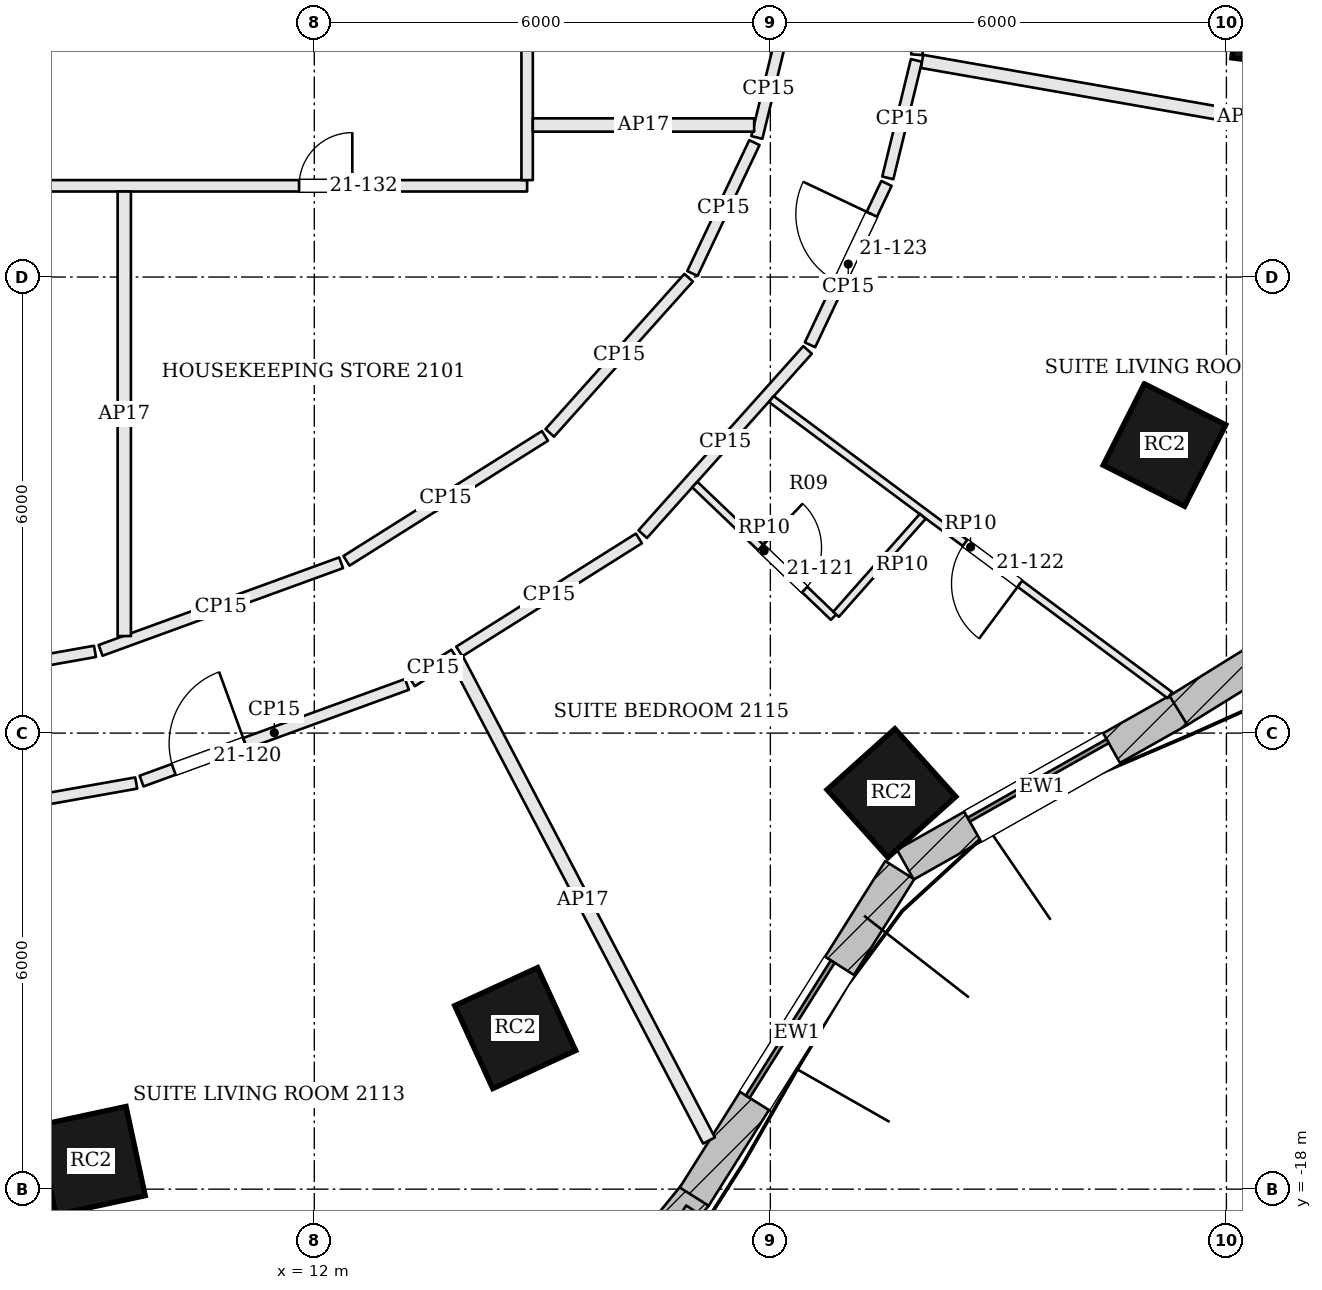
"""IFC4 building model, lengths in metres.
Left out: names, types, materials, properties, quantities, classifications, styles, units other than length and angle.
Written with IfcOpenShell. Run it as: python <this file> out.ifc"""

import sys

from ifc_helpers import new_model, si_unit, direction, frame, frame_2d, origin, origin_2d, place, context, subcontext, project, spatial, rectangle, extrude, element, fill, save


model = new_model("IFC4")
c1 = context("Model", 3, precision=1e-05, world=origin(), true_north=direction((0.0, 1.0)))
c2 = subcontext(c1, "Body", "Model", "MODEL_VIEW")
j1 = project(units=[si_unit("LENGTHUNIT", "METRE"), si_unit("PLANEANGLEUNIT", "RADIAN")], contexts=[c1])
p1 = place(None, origin())
s1 = spatial("IfcSite", under=j1, at=p1, CompositionType="ELEMENT")
p2 = place(p1, origin())
s2 = spatial("IfcBuilding", under=s1, at=p2, CompositionType="ELEMENT")
p3 = place(p2, frame((0.0, 0.0, 92.4)))
s3 = spatial("IfcBuildingStorey", under=s2, at=p3, CompositionType="ELEMENT", Elevation=92.4)
for number, where, z_axis, x_axis in (
    (1, (9.063, -17.625, 0.0), (0.0, 0.0, 1.0), (0.978, 0.21, 0.0)),
    (2, (14.643, -15.881, 0.0), (0.0, 0.0, 1.0), (0.909, 0.417, 0.0)),
    (3, (19.593, -12.79, 0.0), (0.0, 0.0, 1.0), (0.744, 0.668, 0.0)),
    (4, (23.185, -8.21, 0.0), (0.0, 0.0, 1.0), (0.451, 0.893, 0.0)),
    (5, (24.743, -2.599, 0.0), (0.0, 0.0, 1.0), (0.128, 0.992, 0.0)),
):
    element("IfcColumn", number, at=place(p3, frame(where, z_axis=z_axis, x_axis=x_axis)), inside=s3, PredefinedType="COLUMN", context=c2, shape_type="SweptSolid", body=[
        extrude(rectangle(XDim=1.2, YDim=1.2, at=origin_2d()), origin(), (0.0, 0.0, 1.0), 3.6),
    ])
p4 = place(p3, frame((14.926, -20.641, 0.0), z_axis=(0.0, 0.0, 1.0), x_axis=(0.631548074669, 0.775336720001, 0.0)))
e6 = element("IfcWall", 6, at=p4, inside=s3, PredefinedType="SOLIDWALL", context=c2, shape_type="SweptSolid", body=[
    extrude(rectangle(XDim=3.308, YDim=0.45, at=frame_2d((1.654, 0.0))), origin(), (0.0, 0.0, 1.0), 3.4),
])
p5 = place(p4, frame((0.604, 0.0, 0.9)))
e7 = element("IfcOpeningElement", 7, at=p5, cuts=e6, PredefinedType="OPENING", context=c2, shape_type="SweptSolid", body=[
    extrude(rectangle(XDim=2.1, YDim=2.0, at=frame_2d((1.05, 1.0))), frame((0.0, 0.235, 0.0), z_axis=(0.0, -1.0, 0.0), x_axis=(1.0, 0.0, 0.0)), (0.0, 0.0, 1.0), 0.47),
])
p6 = place(p3, frame((16.998, -18.099, 0.0), z_axis=(0.0, 0.0, 1.0), x_axis=(0.532745661304, 0.846275404559, 0.0)))
e8 = element("IfcWall", 8, at=p6, inside=s3, PredefinedType="SOLIDWALL", context=c2, shape_type="SweptSolid", body=[
    extrude(rectangle(XDim=5.076, YDim=0.45, at=frame_2d((2.538, 0.0))), origin(), (0.0, 0.0, 1.0), 3.4),
])
p7 = place(p6, frame((1.488, 0.0, 0.9)))
e9 = element("IfcOpeningElement", 9, at=p7, cuts=e8, PredefinedType="OPENING", context=c2, shape_type="SweptSolid", body=[
    extrude(rectangle(XDim=2.1, YDim=2.0, at=frame_2d((1.05, 1.0))), frame((0.0, 0.235, 0.0), z_axis=(0.0, -1.0, 0.0), x_axis=(1.0, 0.0, 0.0)), (0.0, 0.0, 1.0), 0.47),
])
p8 = place(p3, frame((19.776, -13.731, 0.0), z_axis=(0.0, 0.0, 1.0), x_axis=(0.870610133829, 0.491973571318, 0.0)))
e10 = element("IfcWall", 10, at=p8, inside=s3, PredefinedType="SOLIDWALL", context=c2, shape_type="SweptSolid", body=[
    extrude(rectangle(XDim=4.134, YDim=0.45, at=frame_2d((2.067, 0.0))), origin(), (0.0, 0.0, 1.0), 3.4),
])
p9 = place(p8, frame((1.017, 0.0, 0.9)))
e11 = element("IfcOpeningElement", 11, at=p9, cuts=e10, PredefinedType="OPENING", context=c2, shape_type="SweptSolid", body=[
    extrude(rectangle(XDim=2.1, YDim=2.0, at=frame_2d((1.05, 1.0))), frame((0.0, 0.235, 0.0), z_axis=(0.0, -1.0, 0.0), x_axis=(1.0, 0.0, 0.0)), (0.0, 0.0, 1.0), 0.47),
])
p10 = place(p3, frame((23.368, -11.701, 0.0), z_axis=(0.0, 0.0, 1.0), x_axis=(0.850251408633, 0.526376806211, 0.0)))
e12 = element("IfcWall", 12, at=p10, inside=s3, PredefinedType="SOLIDWALL", context=c2, shape_type="SweptSolid", body=[
    extrude(rectangle(XDim=5.302, YDim=0.45, at=frame_2d((2.651, 0.0))), origin(), (0.0, 0.0, 1.0), 3.4),
])
p11 = place(p10, frame((1.601, 0.0, 0.9)))
e13 = element("IfcOpeningElement", 13, at=p11, cuts=e12, PredefinedType="OPENING", context=c2, shape_type="SweptSolid", body=[
    extrude(rectangle(XDim=2.1, YDim=2.0, at=frame_2d((1.05, 1.0))), frame((0.0, 0.235, 0.0), z_axis=(0.0, -1.0, 0.0), x_axis=(1.0, 0.0, 0.0)), (0.0, 0.0, 1.0), 0.47),
])
p12 = place(p3, frame((16.838, -18.298, 0.0), z_axis=(0.0, 0.0, 1.0), x_axis=(0.835871900419, -0.548924554097, 0.0)))
e14 = element("IfcWall", 14, at=p12, inside=s3, PredefinedType="SOLIDWALL", context=c2, shape_type="SweptSolid", body=[
    extrude(rectangle(XDim=1.75, YDim=0.2, at=frame_2d((0.875, 0.0))), origin(), (0.0, 0.0, 1.0), 3.4),
])
p13 = place(p3, frame((5.015, -13.48, 0.0), z_axis=(0.0, 0.0, 1.0), x_axis=(0.984637772103, 0.174609443467, 0.0)))
e15 = element("IfcWall", 15, at=p13, inside=s3, PredefinedType="PARTITIONING", context=c2, shape_type="SweptSolid", body=[
    extrude(rectangle(XDim=4.715, YDim=0.15, at=frame_2d((2.357, 0.0))), origin(), (0.0, 0.0, 1.0), 2.784),
])
p14 = place(p3, frame((9.728, -12.631, 0.0), z_axis=(0.0, 0.0, 1.0), x_axis=(0.939626438181, 0.342201923826, 0.0)))
e16 = element("IfcWall", 16, at=p14, inside=s3, PredefinedType="PARTITIONING", context=c2, shape_type="SweptSolid", body=[
    extrude(rectangle(XDim=3.716, YDim=0.15, at=frame_2d((1.858, 0.0))), origin(), (0.0, 0.0, 1.0), 2.784),
])
p15 = place(p14, frame((0.45, 0.0, 0.0)))
e17 = element("IfcOpeningElement", 17, at=p15, cuts=e16, PredefinedType="OPENING", context=c2, shape_type="SweptSolid", body=[
    extrude(rectangle(XDim=1.0, YDim=2.1, at=frame_2d((0.5, 1.05))), frame((0.0, 0.085, 0.0), z_axis=(0.0, -1.0, 0.0), x_axis=(1.0, 0.0, 0.0)), (0.0, 0.0, 1.0), 0.17),
])
p16 = place(p3, frame((13.283, -11.319, 0.0), z_axis=(0.0, 0.0, 1.0), x_axis=(0.846275904875, 0.532744866543, 0.0)))
e18 = element("IfcWall", 18, at=p16, inside=s3, PredefinedType="PARTITIONING", context=c2, shape_type="SweptSolid", body=[
    extrude(rectangle(XDim=0.663, YDim=0.15, at=frame_2d((0.331, 0.0))), origin(), (0.0, 0.0, 1.0), 2.784),
])
p17 = place(p3, frame((17.193, -17.36, 0.0), z_axis=(0.0, 0.0, 1.0), x_axis=(-0.464005717448, 0.8858322043, 0.0)))
e19 = element("IfcWall", 19, at=p17, inside=s3, PredefinedType="PARTITIONING", context=c2, shape_type="SweptSolid", body=[
    extrude(rectangle(XDim=7.143, YDim=0.175, at=frame_2d((3.571, 0.0))), origin(), (0.0, 0.0, 1.0), 2.784),
])
p18 = place(p3, frame((13.907, -10.927, 0.0), z_axis=(0.0, 0.0, 1.0), x_axis=(0.846289768331, 0.53272284353, 0.0)))
e20 = element("IfcWall", 20, at=p18, inside=s3, PredefinedType="PARTITIONING", context=c2, shape_type="SweptSolid", body=[
    extrude(rectangle(XDim=2.793, YDim=0.15, at=frame_2d((1.396, 0.0))), origin(), (0.0, 0.0, 1.0), 2.784),
])
p19 = place(p3, frame((16.321, -9.383, 0.0), z_axis=(0.0, 0.0, 1.0), x_axis=(0.666834356165, 0.745205972492, 0.0)))
e21 = element("IfcWall", 21, at=p19, inside=s3, PredefinedType="PARTITIONING", context=c2, shape_type="SweptSolid", body=[
    extrude(rectangle(XDim=3.252, YDim=0.15, at=frame_2d((1.626, 0.0))), origin(), (0.0, 0.0, 1.0), 2.784),
])
p20 = place(p3, frame((18.522, -6.891, 0.0), z_axis=(0.0, 0.0, 1.0), x_axis=(0.428157819028, 0.903703979191, 0.0)))
e22 = element("IfcWall", 22, at=p20, inside=s3, PredefinedType="PARTITIONING", context=c2, shape_type="SweptSolid", body=[
    extrude(rectangle(XDim=2.349, YDim=0.15, at=frame_2d((1.175, 0.0))), origin(), (0.0, 0.0, 1.0), 2.784),
])
p21 = place(p20, frame((0.9, 0.0, 0.0)))
e23 = element("IfcOpeningElement", 23, at=p21, cuts=e22, PredefinedType="OPENING", context=c2, shape_type="SweptSolid", body=[
    extrude(rectangle(XDim=1.0, YDim=2.1, at=frame_2d((0.5, 1.05))), frame((0.0, 0.085, 0.0), z_axis=(0.0, -1.0, 0.0), x_axis=(1.0, 0.0, 0.0)), (0.0, 0.0, 1.0), 0.17),
])
p22 = place(p3, frame((19.545, -4.696, 0.0), z_axis=(0.0, 0.0, 1.0), x_axis=(0.236715862945, 0.971578921257, 0.0)))
e24 = element("IfcWall", 24, at=p22, inside=s3, PredefinedType="PARTITIONING", context=c2, shape_type="SweptSolid", body=[
    extrude(rectangle(XDim=1.59, YDim=0.15, at=frame_2d((0.795, 0.0))), origin(), (0.0, 0.0, 1.0), 2.784),
])
p23 = place(p3, frame((28.436, -4.638, 0.0), z_axis=(0.0, 0.0, 1.0), x_axis=(-0.985072773891, 0.172138404023, 0.0)))
e25 = element("IfcWall", 25, at=p23, inside=s3, PredefinedType="PARTITIONING", context=c2, shape_type="SweptSolid", body=[
    extrude(rectangle(XDim=8.568, YDim=0.175, at=frame_2d((4.284, 0.0))), origin(), (0.0, 0.0, 1.0), 2.784),
])
p24 = place(p3, frame((19.927, -3.076, 0.0), z_axis=(0.0, 0.0, 1.0), x_axis=(0.071888451482, 0.997412678155, 0.0)))
e26 = element("IfcWall", 26, at=p24, inside=s3, PredefinedType="PARTITIONING", context=c2, shape_type="SweptSolid", body=[
    extrude(rectangle(XDim=3.084, YDim=0.15, at=frame_2d((1.542, 0.0))), origin(), (0.0, 0.0, 1.0), 2.784),
])
p25 = place(p3, frame((18.135, -2.882, 0.0), z_axis=(0.0, 0.0, 1.0), x_axis=(-0.236653741324, -0.971594054489, 0.0)))
e27 = element("IfcWall", 27, at=p25, inside=s3, PredefinedType="PARTITIONING", context=c2, shape_type="SweptSolid", body=[
    extrude(rectangle(XDim=1.32, YDim=0.15, at=frame_2d((0.66, 0.0))), origin(), (0.0, 0.0, 1.0), 2.784),
])
p26 = place(p3, frame((17.79, -4.231, 0.0), z_axis=(0.0, 0.0, 1.0), x_axis=(-0.428042272357, -0.90375871397, 0.0)))
e28 = element("IfcWall", 28, at=p26, inside=s3, PredefinedType="PARTITIONING", context=c2, shape_type="SweptSolid", body=[
    extrude(rectangle(XDim=1.905, YDim=0.15, at=frame_2d((0.953, 0.0))), origin(), (0.0, 0.0, 1.0), 2.784),
])
p27 = place(p3, frame((16.925, -6.009, 0.0), z_axis=(0.0, 0.0, 1.0), x_axis=(-0.666893859891, -0.745152722359, 0.0)))
e29 = element("IfcWall", 29, at=p27, inside=s3, PredefinedType="PARTITIONING", context=c2, shape_type="SweptSolid", body=[
    extrude(rectangle(XDim=2.739, YDim=0.15, at=frame_2d((1.37, 0.0))), origin(), (0.0, 0.0, 1.0), 2.784),
])
p28 = place(p3, frame((15.034, -8.09, 0.0), z_axis=(0.0, 0.0, 1.0), x_axis=(-0.846322679414, -0.532670557014, 0.0)))
e30 = element("IfcWall", 30, at=p28, inside=s3, PredefinedType="PARTITIONING", context=c2, shape_type="SweptSolid", body=[
    extrude(rectangle(XDim=3.085, YDim=0.15, at=frame_2d((1.543, 0.0))), origin(), (0.0, 0.0, 1.0), 2.784),
])
p29 = place(p3, frame((12.353, -9.76, 0.0), z_axis=(0.0, 0.0, 1.0), x_axis=(-0.939632450309, -0.342185415127, 0.0)))
e31 = element("IfcWall", 31, at=p29, inside=s3, PredefinedType="PARTITIONING", context=c2, shape_type="SweptSolid", body=[
    extrude(rectangle(XDim=3.368, YDim=0.15, at=frame_2d((1.684, 0.0))), origin(), (0.0, 0.0, 1.0), 2.784),
])
p30 = place(p3, frame((9.115, -10.925, 0.0), z_axis=(0.0, 0.0, 1.0), x_axis=(-0.984632605417, -0.174638576352, 0.0)))
e32 = element("IfcWall", 32, at=p30, inside=s3, PredefinedType="PARTITIONING", context=c2, shape_type="SweptSolid", body=[
    extrude(rectangle(XDim=4.423, YDim=0.15, at=frame_2d((2.211, 0.0))), origin(), (0.0, 0.0, 1.0), 2.784),
])
p31 = place(p3, frame((-14.725, -4.8, 0.0), z_axis=(0.0, 0.0, 1.0), x_axis=(1.0, 0.0, 0.0)))
e33 = element("IfcWall", 33, at=p31, inside=s3, PredefinedType="PARTITIONING", context=c2, shape_type="SweptSolid", body=[
    extrude(rectangle(XDim=29.525, YDim=0.15, at=frame_2d((14.763, 0.0))), origin(), (0.0, 0.0, 1.0), 2.784),
])
p32 = place(p31, frame((2.075, 0.0, 0.0)))
e34 = element("IfcOpeningElement", 34, at=p32, cuts=e33, PredefinedType="OPENING", context=c2, shape_type="SweptSolid", body=[
    extrude(rectangle(XDim=1.0, YDim=2.1, at=frame_2d((0.5, 1.05))), frame((0.0, 0.085, 0.0), z_axis=(0.0, -1.0, 0.0), x_axis=(1.0, 0.0, 0.0)), (0.0, 0.0, 1.0), 0.17),
])
p33 = place(p31, frame((13.825, 0.0, 0.0)))
e35 = element("IfcOpeningElement", 35, at=p33, cuts=e33, PredefinedType="OPENING", context=c2, shape_type="SweptSolid", body=[
    extrude(rectangle(XDim=1.8, YDim=2.1, at=frame_2d((0.9, 1.05))), frame((0.0, 0.085, 0.0), z_axis=(0.0, -1.0, 0.0), x_axis=(1.0, 0.0, 0.0)), (0.0, 0.0, 1.0), 0.17),
])
p34 = place(p31, frame((26.525, 0.0, 0.0)))
e36 = element("IfcOpeningElement", 36, at=p34, cuts=e33, PredefinedType="OPENING", context=c2, shape_type="SweptSolid", body=[
    extrude(rectangle(XDim=0.7, YDim=2.1, at=frame_2d((0.35, 1.05))), frame((0.0, 0.085, 0.0), z_axis=(0.0, -1.0, 0.0), x_axis=(1.0, 0.0, 0.0)), (0.0, 0.0, 1.0), 0.17),
])
p35 = place(p3, frame((14.8, -4.725, 0.0), z_axis=(0.0, 0.0, 1.0), x_axis=(0.0, 1.0, 0.0)))
e37 = element("IfcWall", 37, at=p35, inside=s3, PredefinedType="PARTITIONING", context=c2, shape_type="SweptSolid", body=[
    extrude(rectangle(XDim=12.948, YDim=0.15, at=frame_2d((6.474, 0.0))), origin(), (0.0, 0.0, 1.0), 2.784),
])
p36 = place(p35, frame((6.336, 0.0, 0.0)))
e38 = element("IfcOpeningElement", 38, at=p36, cuts=e37, PredefinedType="OPENING", context=c2, shape_type="SweptSolid", body=[
    extrude(rectangle(XDim=1.0, YDim=2.1, at=frame_2d((0.5, 1.05))), frame((0.0, 0.085, 0.0), z_axis=(0.0, -1.0, 0.0), x_axis=(1.0, 0.0, 0.0)), (0.0, 0.0, 1.0), 0.17),
])
p37 = place(p3, frame((23.256, -11.501, 0.0), z_axis=(0.0, 0.0, 1.0), x_axis=(-0.802700401869, 0.596382482003, 0.0)))
e39 = element("IfcWall", 39, at=p37, inside=s3, PredefinedType="PARTITIONING", context=c2, shape_type="SweptSolid", body=[
    extrude(rectangle(XDim=6.533, YDim=0.1, at=frame_2d((3.267, 0.0))), origin(), (0.0, 0.0, 1.0), 2.884),
])
p38 = place(p37, frame((2.458, 0.0, 0.0)))
e40 = element("IfcOpeningElement", 40, at=p38, cuts=e39, PredefinedType="OPENING", context=c2, shape_type="SweptSolid", body=[
    extrude(rectangle(XDim=0.9, YDim=2.4, at=frame_2d((0.45, 1.2))), frame((0.0, 0.06, 0.0), z_axis=(0.0, -1.0, 0.0), x_axis=(1.0, 0.0, 0.0)), (0.0, 0.0, 1.0), 0.12),
])
p39 = place(p3, frame((17.006, -8.73, 0.0), z_axis=(0.0, 0.0, 1.0), x_axis=(0.722927369978, -0.690924031813, 0.0)))
e41 = element("IfcWall", 41, at=p39, inside=s3, PredefinedType="PARTITIONING", context=c2, shape_type="SweptSolid", body=[
    extrude(rectangle(XDim=2.525, YDim=0.1, at=frame_2d((1.263, 0.0))), origin(), (0.0, 0.0, 1.0), 2.884),
])
p40 = place(p39, frame((1.2, 0.0, 0.0)))
e42 = element("IfcOpeningElement", 42, at=p40, cuts=e41, PredefinedType="OPENING", context=c2, shape_type="SweptSolid", body=[
    extrude(rectangle(XDim=0.8, YDim=2.1, at=frame_2d((0.4, 1.05))), frame((0.0, 0.06, 0.0), z_axis=(0.0, -1.0, 0.0), x_axis=(1.0, 0.0, 0.0)), (0.0, 0.0, 1.0), 0.12),
])
p41 = place(p3, frame((18.865, -10.437, 0.0), z_axis=(0.0, 0.0, 1.0), x_axis=(0.662901257744, 0.748706833468, 0.0)))
e43 = element("IfcWall", 43, at=p41, inside=s3, PredefinedType="PARTITIONING", context=c2, shape_type="SweptSolid", body=[
    extrude(rectangle(XDim=1.721, YDim=0.1, at=frame_2d((0.861, 0.0))), origin(), (0.0, 0.0, 1.0), 2.884),
])
p42 = place(p3, frame((9.5, -10.723, 0.0), z_axis=(0.0, 0.0, 1.0), x_axis=(0.0, 1.0, 0.0)))
e44 = element("IfcWall", 44, at=p42, inside=s3, PredefinedType="PARTITIONING", context=c2, shape_type="SweptSolid", body=[
    extrude(rectangle(XDim=5.848, YDim=0.175, at=frame_2d((2.924, 0.0))), origin(), (0.0, 0.0, 1.0), 2.784),
])
p43 = place(p3, frame((14.875, -4.0, 0.0), z_axis=(0.0, 0.0, 1.0), x_axis=(1.0, 0.0, 0.0)))
e45 = element("IfcWall", 45, at=p43, inside=s3, PredefinedType="PARTITIONING", context=c2, shape_type="SweptSolid", body=[
    extrude(rectangle(XDim=2.912, YDim=0.175, at=frame_2d((1.456, 0.0))), origin(), (0.0, 0.0, 1.0), 2.784),
])
p44 = place(p7, origin())
e46 = element("IfcWindow", 46, at=p44, inside=s3, PartitioningType="SINGLE_PANEL", PredefinedType="WINDOW", context=c2, shape_type="SweptSolid", body=[
    extrude(rectangle(XDim=2.1, YDim=2.0, at=frame_2d((1.05, 1.0))), frame((0.0, 0.135, 0.0), z_axis=(0.0, -1.0, 0.0), x_axis=(1.0, 0.0, 0.0)), (0.0, 0.0, 1.0), 0.06),
])
fill(e9, e46)
p45 = place(p9, origin())
e47 = element("IfcWindow", 47, at=p45, inside=s3, PartitioningType="SINGLE_PANEL", PredefinedType="WINDOW", context=c2, shape_type="SweptSolid", body=[
    extrude(rectangle(XDim=2.1, YDim=2.0, at=frame_2d((1.05, 1.0))), frame((0.0, 0.135, 0.0), z_axis=(0.0, -1.0, 0.0), x_axis=(1.0, 0.0, 0.0)), (0.0, 0.0, 1.0), 0.06),
])
fill(e11, e47)
p46 = place(p15, origin())
e48 = element("IfcDoor", 48, at=p46, inside=s3, OperationType="SINGLE_SWING_RIGHT", PredefinedType="DOOR", context=c2, shape_type="SweptSolid", body=[
    extrude(rectangle(XDim=1.0, YDim=2.1, at=frame_2d((0.5, 1.05))), frame((0.0, 0.025, 0.0), z_axis=(0.0, -1.0, 0.0), x_axis=(1.0, 0.0, 0.0)), (0.0, 0.0, 1.0), 0.05),
])
fill(e17, e48)
p47 = place(p40, origin())
e49 = element("IfcDoor", 49, at=p47, inside=s3, OperationType="SINGLE_SWING_LEFT", PredefinedType="DOOR", context=c2, shape_type="SweptSolid", body=[
    extrude(rectangle(XDim=0.8, YDim=2.1, at=frame_2d((0.4, 1.05))), frame((0.0, 0.025, 0.0), z_axis=(0.0, -1.0, 0.0), x_axis=(1.0, 0.0, 0.0)), (0.0, 0.0, 1.0), 0.05),
])
fill(e42, e49)
p48 = place(p38, origin())
e50 = element("IfcDoor", 50, at=p48, inside=s3, OperationType="SINGLE_SWING_LEFT", PredefinedType="DOOR", context=c2, shape_type="SweptSolid", body=[
    extrude(rectangle(XDim=0.9, YDim=2.4, at=frame_2d((0.45, 1.2))), frame((0.0, 0.025, 0.0), z_axis=(0.0, -1.0, 0.0), x_axis=(1.0, 0.0, 0.0)), (0.0, 0.0, 1.0), 0.05),
])
fill(e40, e50)
p49 = place(p21, origin())
e51 = element("IfcDoor", 51, at=p49, inside=s3, OperationType="SINGLE_SWING_RIGHT", PredefinedType="DOOR", context=c2, shape_type="SweptSolid", body=[
    extrude(rectangle(XDim=1.0, YDim=2.1, at=frame_2d((0.5, 1.05))), frame((0.0, 0.025, 0.0), z_axis=(0.0, -1.0, 0.0), x_axis=(1.0, 0.0, 0.0)), (0.0, 0.0, 1.0), 0.05),
])
fill(e23, e51)
p50 = place(p34, origin())
e52 = element("IfcDoor", 52, at=p50, inside=s3, OperationType="SINGLE_SWING_RIGHT", PredefinedType="DOOR", context=c2, shape_type="SweptSolid", body=[
    extrude(rectangle(XDim=0.7, YDim=2.1, at=frame_2d((0.35, 1.05))), frame((0.0, 0.025, 0.0), z_axis=(0.0, -1.0, 0.0), x_axis=(1.0, 0.0, 0.0)), (0.0, 0.0, 1.0), 0.05),
])
fill(e36, e52)
save(model, sys.argv[1])
